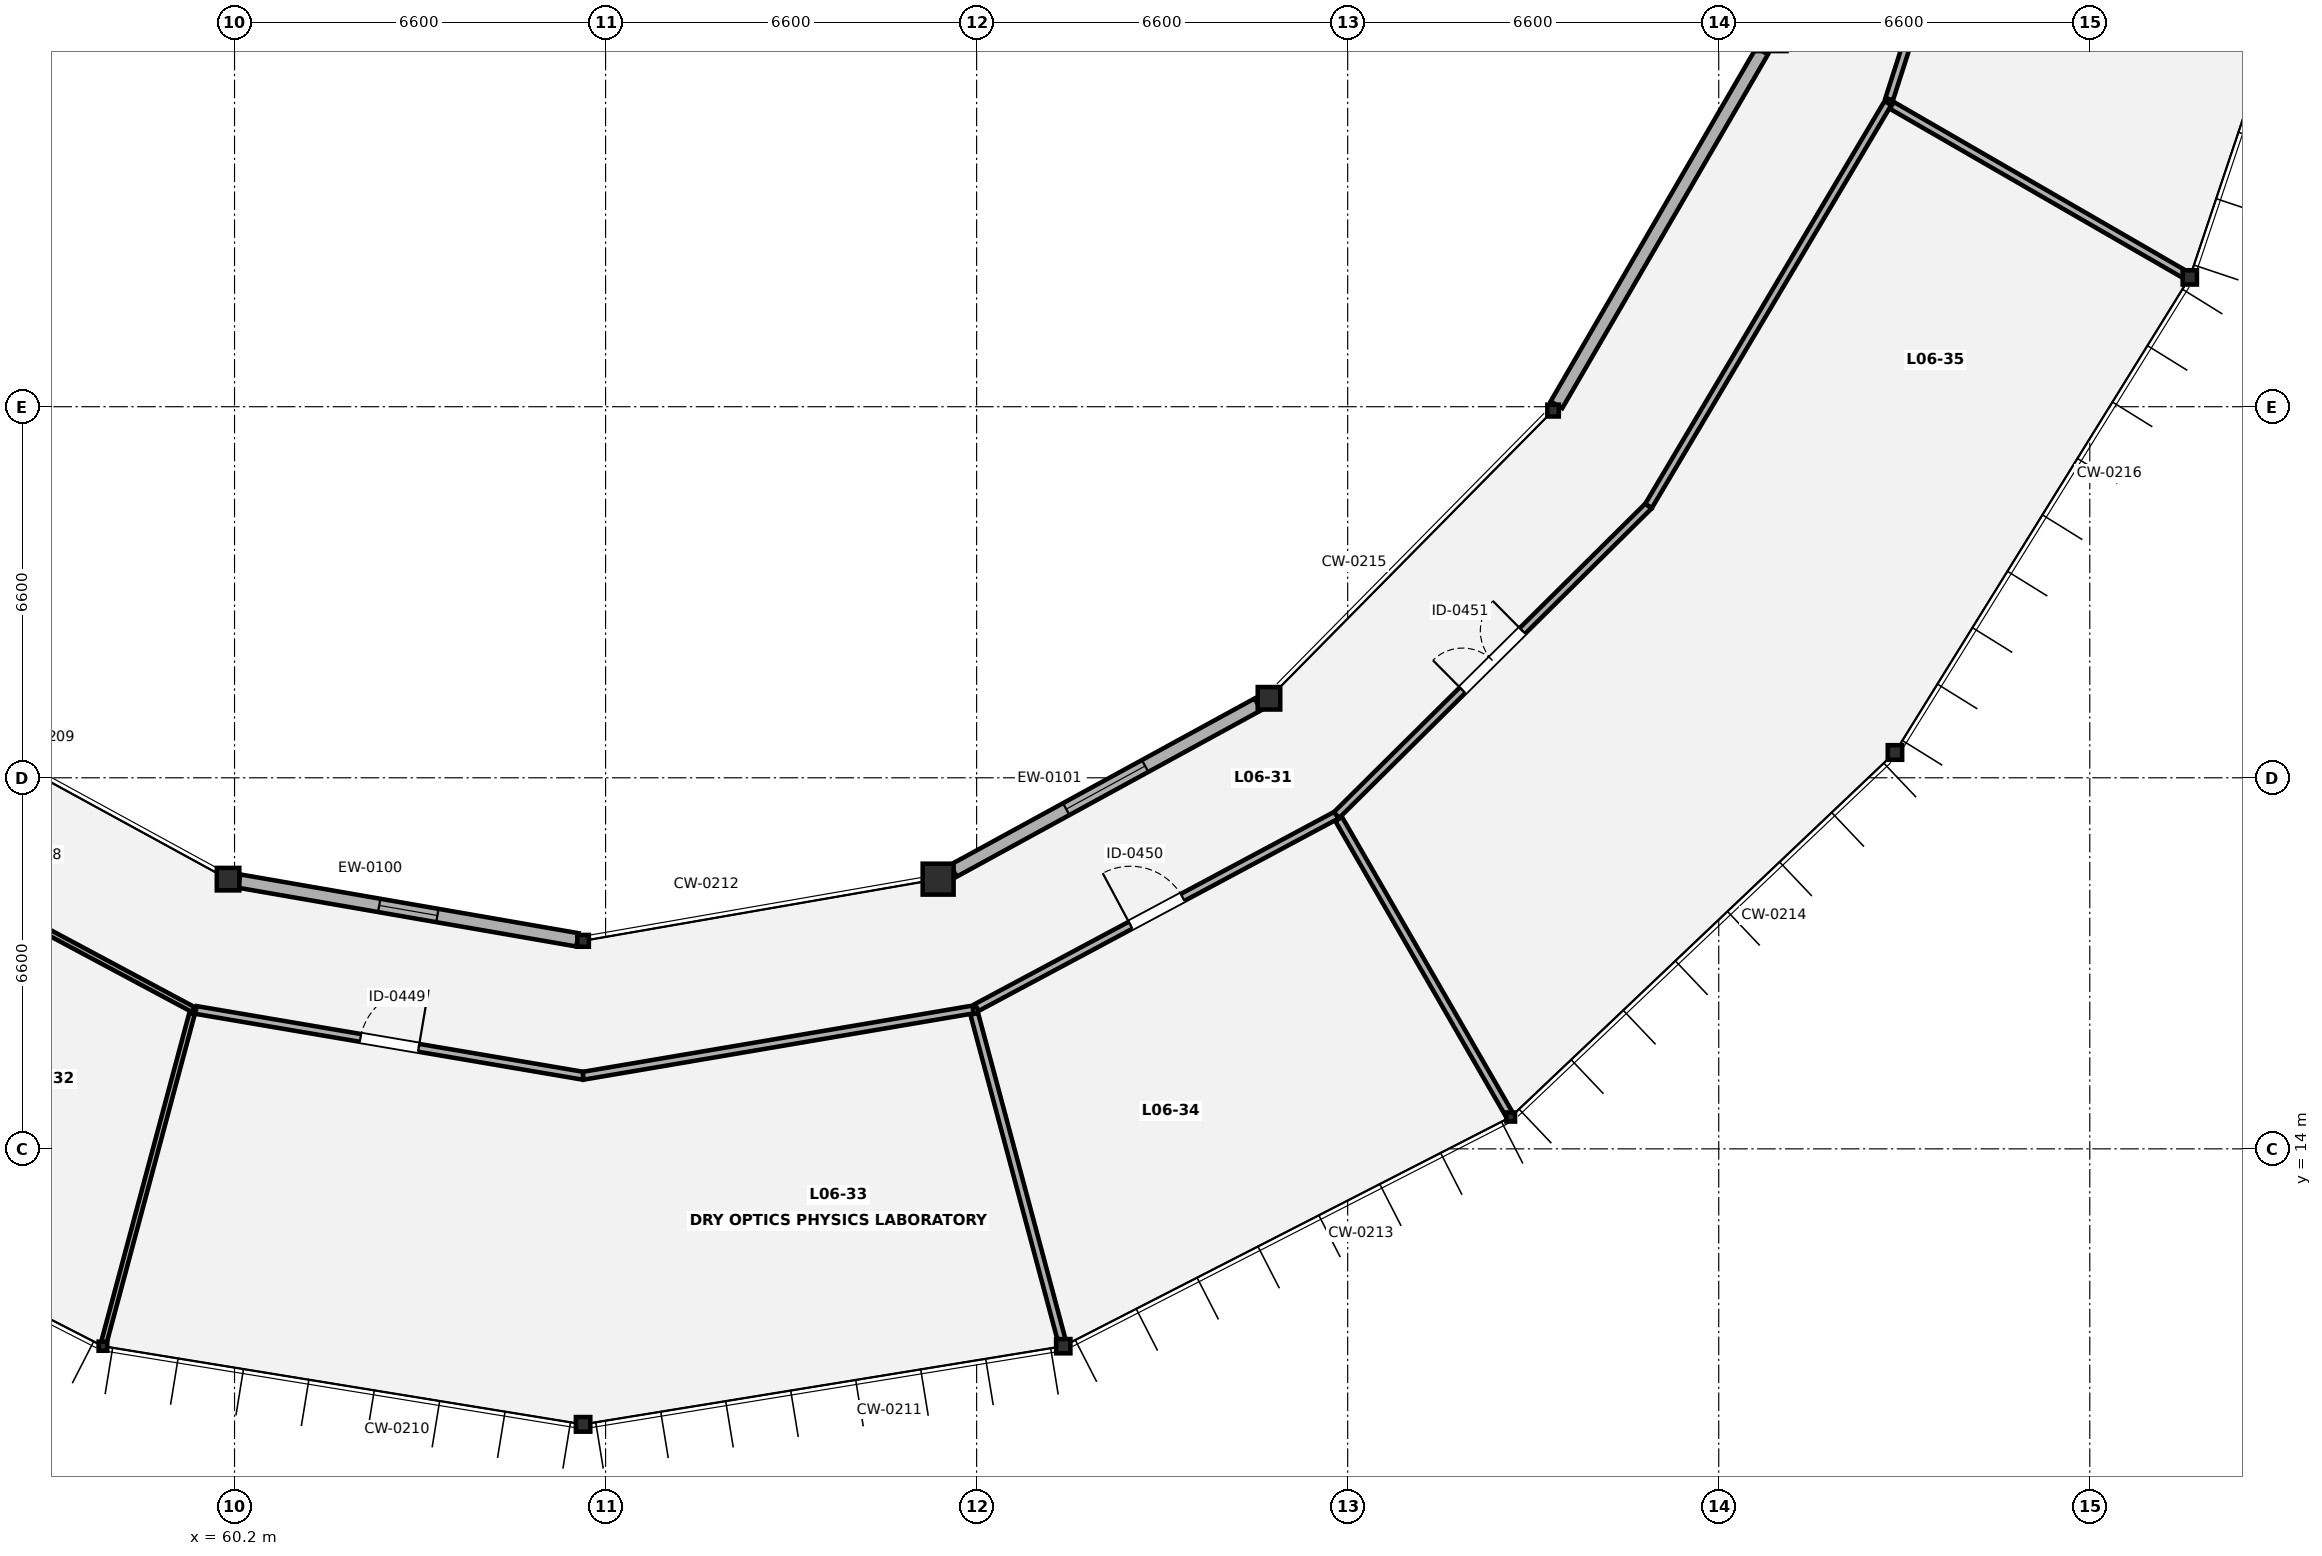
"""IFC4 building model, lengths in metres.
Left out: names, types, materials, properties, quantities, classifications, styles, units other than length and angle.
Written with IfcOpenShell. Run it as: python <this file> out.ifc"""

import sys

from ifc_helpers import new_model, si_unit, direction, frame, frame_2d, origin, origin_2d, place, context, subcontext, project, spatial, rectangle, i_section, extrude, element, fill, save


model = new_model("IFC4")
c1 = context("Model", 3, precision=1e-05, world=origin(), true_north=direction((0.0, 1.0)))
c2 = subcontext(c1, "Body", "Model", "MODEL_VIEW")
j1 = project(units=[si_unit("LENGTHUNIT", "METRE"), si_unit("PLANEANGLEUNIT", "RADIAN")], contexts=[c1])
p1 = place(None, origin())
s1 = spatial("IfcSite", under=j1, at=p1, CompositionType="ELEMENT")
p2 = place(p1, origin())
s2 = spatial("IfcBuilding", under=s1, at=p2, CompositionType="ELEMENT")
p3 = place(p2, frame((0.0, 0.0, 25.9)))
s3 = spatial("IfcBuildingStorey", under=s2, at=p3, CompositionType="ELEMENT", Elevation=25.9)
p4 = place(p3, frame((57.859, 10.49, 0.0), z_axis=(0.0, 0.0, 1.0), x_axis=(1.0, 0.0, 0.0)))
e1 = element("IfcColumn", 1, at=p4, inside=s3, PredefinedType="COLUMN", context=c2, shape_type="SweptSolid", body=[
    extrude(i_section(OverallWidth=0.154, OverallDepth=0.162, WebThickness=0.008, FlangeThickness=0.011, FilletRadius=0.009, at=origin_2d()), origin(), (0.0, 0.0, 1.0), 4.2),
])
p5 = place(p3, frame((60.085, 18.797, 0.0), z_axis=(0.0, 0.0, 1.0), x_axis=(1.0, 0.0, 0.0)))
e2 = element("IfcColumn", 2, at=p5, inside=s3, PredefinedType="PILASTER", context=c2, shape_type="SweptSolid", body=[
    extrude(rectangle(XDim=0.4, YDim=0.4, at=origin_2d()), origin(), (0.0, 0.0, 1.0), 4.2),
])
p6 = place(p3, frame((66.4, 9.1, 0.0), z_axis=(0.0, 0.0, 1.0), x_axis=(1.0, 0.0, 0.0)))
e3 = element("IfcColumn", 3, at=p6, inside=s3, PredefinedType="COLUMN", context=c2, shape_type="SweptSolid", body=[
    extrude(i_section(OverallWidth=0.256, OverallDepth=0.26, WebThickness=0.01, FlangeThickness=0.017, FilletRadius=0.014, at=origin_2d()), origin(), (0.0, 0.0, 1.0), 4.2),
])
p7 = place(p3, frame((66.4, 17.7, 0.0), z_axis=(0.0, 0.0, 1.0), x_axis=(1.0, 0.0, 0.0)))
e4 = element("IfcColumn", 4, at=p7, inside=s3, PredefinedType="COLUMN", context=c2, shape_type="SweptSolid", body=[
    extrude(i_section(OverallWidth=0.205, OverallDepth=0.21, WebThickness=0.009, FlangeThickness=0.014, FilletRadius=0.011, at=origin_2d()), origin(), (0.0, 0.0, 1.0), 4.2),
])
p8 = place(p3, frame((74.941, 10.49, 0.0), z_axis=(0.0, 0.0, 1.0), x_axis=(1.0, 0.0, 0.0)))
e5 = element("IfcColumn", 5, at=p8, inside=s3, PredefinedType="COLUMN", context=c2, shape_type="SweptSolid", body=[
    extrude(i_section(OverallWidth=0.254, OverallDepth=0.254, WebThickness=0.009, FlangeThickness=0.014, FilletRadius=0.014, at=origin_2d()), origin(), (0.0, 0.0, 1.0), 4.2),
])
p9 = place(p3, frame((72.715, 18.797, 0.0), z_axis=(0.0, 0.0, 1.0), x_axis=(1.0, 0.0, 0.0)))
e6 = element("IfcColumn", 6, at=p9, inside=s3, PredefinedType="COLUMN", context=c2, shape_type="SweptSolid", body=[
    extrude(rectangle(XDim=0.55, YDim=0.55, at=origin_2d()), origin(), (0.0, 0.0, 1.0), 4.2),
])
p10 = place(p3, frame((82.9, 14.566, 0.0), z_axis=(0.0, 0.0, 1.0), x_axis=(1.0, 0.0, 0.0)))
e7 = element("IfcColumn", 7, at=p10, inside=s3, PredefinedType="COLUMN", context=c2, shape_type="SweptSolid", body=[
    extrude(i_section(OverallWidth=0.154, OverallDepth=0.162, WebThickness=0.008, FlangeThickness=0.011, FilletRadius=0.009, at=origin_2d()), origin(), (0.0, 0.0, 1.0), 4.2),
])
p11 = place(p3, frame((78.6, 22.014, 0.0), z_axis=(0.0, 0.0, 1.0), x_axis=(1.0, 0.0, 0.0)))
e8 = element("IfcColumn", 8, at=p11, inside=s3, PredefinedType="PILASTER", context=c2, shape_type="SweptSolid", body=[
    extrude(rectangle(XDim=0.4, YDim=0.4, at=origin_2d()), origin(), (0.0, 0.0, 1.0), 4.2),
])
p12 = place(p3, frame((89.735, 21.05, 0.0), z_axis=(0.0, 0.0, 1.0), x_axis=(1.0, 0.0, 0.0)))
e9 = element("IfcColumn", 9, at=p12, inside=s3, PredefinedType="COLUMN", context=c2, shape_type="SweptSolid", body=[
    extrude(i_section(OverallWidth=0.256, OverallDepth=0.26, WebThickness=0.01, FlangeThickness=0.017, FilletRadius=0.014, at=origin_2d()), origin(), (0.0, 0.0, 1.0), 4.2),
])
p13 = place(p3, frame((83.653, 27.131, 0.0), z_axis=(0.0, 0.0, 1.0), x_axis=(1.0, 0.0, 0.0)))
e10 = element("IfcColumn", 10, at=p13, inside=s3, PredefinedType="COLUMN", context=c2, shape_type="SweptSolid", body=[
    extrude(i_section(OverallWidth=0.205, OverallDepth=0.21, WebThickness=0.009, FlangeThickness=0.014, FilletRadius=0.011, at=origin_2d()), origin(), (0.0, 0.0, 1.0), 4.2),
])
p14 = place(p3, frame((94.979, 29.5, 0.0), z_axis=(0.0, 0.0, 1.0), x_axis=(1.0, 0.0, 0.0)))
e11 = element("IfcColumn", 11, at=p14, inside=s3, PredefinedType="COLUMN", context=c2, shape_type="SweptSolid", body=[
    extrude(i_section(OverallWidth=0.254, OverallDepth=0.254, WebThickness=0.009, FlangeThickness=0.014, FilletRadius=0.014, at=origin_2d()), origin(), (0.0, 0.0, 1.0), 4.2),
])
p15 = place(p3, frame((60.283, 18.763, 0.0), z_axis=(0.0, 0.0, 1.0), x_axis=(0.985246064368, -0.171143777706, 0.0)))
e12 = element("IfcWall", 12, at=p15, inside=s3, PredefinedType="SOLIDWALL", context=c2, shape_type="SweptSolid", body=[
    extrude(rectangle(XDim=6.107, YDim=0.24, at=frame_2d((3.053, 0.0))), origin(), (0.0, 0.0, 1.0), 3.6),
])
p16 = place(p15, frame((2.528, 0.0, 0.85)))
e13 = element("IfcOpeningElement", 13, at=p16, cuts=e12, PredefinedType="OPENING", context=c2, shape_type="SweptSolid", body=[
    extrude(rectangle(XDim=1.05, YDim=1.35, at=frame_2d((0.525, 0.675))), frame((0.0, 0.13, 0.0), z_axis=(0.0, -1.0, 0.0), x_axis=(1.0, 0.0, 0.0)), (0.0, 0.0, 1.0), 0.26),
])
p17 = place(p3, frame((72.988, 18.947, 0.0), z_axis=(0.0, 0.0, 1.0), x_axis=(0.877477839064, 0.479617182712, 0.0)))
e14 = element("IfcWall", 14, at=p17, inside=s3, PredefinedType="SOLIDWALL", context=c2, shape_type="SweptSolid", body=[
    extrude(rectangle(XDim=6.169, YDim=0.24, at=frame_2d((3.085, 0.0))), origin(), (0.0, 0.0, 1.0), 3.6),
])
p18 = place(p17, frame((2.285, 0.0, 0.85)))
e15 = element("IfcOpeningElement", 15, at=p18, cuts=e14, PredefinedType="OPENING", context=c2, shape_type="SweptSolid", body=[
    extrude(rectangle(XDim=1.6, YDim=1.5, at=frame_2d((0.8, 0.75))), frame((0.0, 0.13, 0.0), z_axis=(0.0, -1.0, 0.0), x_axis=(1.0, 0.0, 0.0)), (0.0, 0.0, 1.0), 0.26),
])
p19 = place(p3, frame((83.713, 27.235, 0.0), z_axis=(0.0, 0.0, 1.0), x_axis=(0.502677590803, 0.864473967048, 0.0)))
e16 = element("IfcWall", 16, at=p19, inside=s3, PredefinedType="SOLIDWALL", context=c2, shape_type="SweptSolid", body=[
    extrude(rectangle(XDim=7.278, YDim=0.24, at=frame_2d((3.639, 0.0))), origin(), (0.0, 0.0, 1.0), 3.6),
])
p20 = place(p3, frame((53.0, 19.936, 0.0), z_axis=(0.0, 0.0, 1.0), x_axis=(0.88182684056, -0.471573348768, 0.0)))
e17 = element("IfcWall", 17, at=p20, inside=s3, PredefinedType="PARTITIONING", context=c2, shape_type="SweptSolid", body=[
    extrude(rectangle(XDim=7.33, YDim=0.1, at=frame_2d((3.665, 0.0))), origin(), (0.0, 0.0, 1.0), 4.0),
])
p21 = place(p20, frame((3.165, 0.0, 0.0)))
e18 = element("IfcOpeningElement", 18, at=p21, cuts=e17, PredefinedType="OPENING", context=c2, shape_type="SweptSolid", body=[
    extrude(rectangle(XDim=1.0, YDim=2.1, at=frame_2d((0.5, 1.05))), frame((0.0, 0.06, 0.0), z_axis=(0.0, -1.0, 0.0), x_axis=(1.0, 0.0, 0.0)), (0.0, 0.0, 1.0), 0.12),
])
p22 = place(p3, frame((59.443, 16.402, 0.0), z_axis=(0.0, 0.0, 1.0), x_axis=(-0.258805895167, -0.965929349708, 0.0)))
e19 = element("IfcWall", 19, at=p22, inside=s3, PredefinedType="PARTITIONING", context=c2, shape_type="SweptSolid", body=[
    extrude(rectangle(XDim=6.06, YDim=0.1, at=frame_2d((3.03, 0.0))), origin(), (0.0, 0.0, 1.0), 3.522),
])
p23 = place(p3, frame((59.515, 16.47, 0.0), z_axis=(0.0, 0.0, 1.0), x_axis=(0.985861622289, -0.167561516157, 0.0)))
e20 = element("IfcWall", 20, at=p23, inside=s3, PredefinedType="PARTITIONING", context=c2, shape_type="SweptSolid", body=[
    extrude(rectangle(XDim=6.983, YDim=0.14, at=frame_2d((3.492, 0.0))), origin(), (0.0, 0.0, 1.0), 4.0),
])
p24 = place(p23, frame((2.967, 0.0, 0.0)))
e21 = element("IfcOpeningElement", 21, at=p24, cuts=e20, PredefinedType="OPENING", context=c2, shape_type="SweptSolid", body=[
    extrude(rectangle(XDim=1.05, YDim=2.15, at=frame_2d((0.525, 1.075))), frame((0.0, 0.08, 0.0), z_axis=(0.0, -1.0, 0.0), x_axis=(1.0, 0.0, 0.0)), (0.0, 0.0, 1.0), 0.16),
])
p25 = place(p3, frame((66.402, 15.3, 0.0), z_axis=(0.0, 0.0, 1.0), x_axis=(0.985858771321, 0.167578289193, 0.0)))
e22 = element("IfcWall", 22, at=p25, inside=s3, PredefinedType="PARTITIONING", context=c2, shape_type="SweptSolid", body=[
    extrude(rectangle(XDim=7.034, YDim=0.14, at=frame_2d((3.517, 0.0))), origin(), (0.0, 0.0, 1.0), 4.0),
])
p26 = place(p3, frame((73.357, 16.402, 0.0), z_axis=(0.0, 0.0, 1.0), x_axis=(0.258805895167, -0.965929349708, 0.0)))
e23 = element("IfcWall", 23, at=p26, inside=s3, PredefinedType="PARTITIONING", context=c2, shape_type="SweptSolid", body=[
    extrude(rectangle(XDim=6.06, YDim=0.14, at=frame_2d((3.03, 0.0))), origin(), (0.0, 0.0, 1.0), 3.522),
])
p27 = place(p3, frame((73.402, 16.514, 0.0), z_axis=(0.0, 0.0, 1.0), x_axis=(0.881829873621, 0.471567676999, 0.0)))
e24 = element("IfcWall", 24, at=p27, inside=s3, PredefinedType="PARTITIONING", context=c2, shape_type="SweptSolid", body=[
    extrude(rectangle(XDim=7.256, YDim=0.14, at=frame_2d((3.628, 0.0))), origin(), (0.0, 0.0, 1.0), 4.0),
])
p28 = place(p27, frame((3.103, 0.0, 0.0)))
e25 = element("IfcOpeningElement", 25, at=p28, cuts=e24, PredefinedType="OPENING", context=c2, shape_type="SweptSolid", body=[
    extrude(rectangle(XDim=1.05, YDim=2.15, at=frame_2d((0.525, 1.075))), frame((0.0, 0.08, 0.0), z_axis=(0.0, -1.0, 0.0), x_axis=(1.0, 0.0, 0.0)), (0.0, 0.0, 1.0), 0.16),
])
p29 = place(p3, frame((79.84, 19.866, 0.0), z_axis=(0.0, 0.0, 1.0), x_axis=(0.500008418462, -0.866020543329, 0.0)))
e26 = element("IfcWall", 26, at=p29, inside=s3, PredefinedType="PARTITIONING", context=c2, shape_type="SweptSolid", body=[
    extrude(rectangle(XDim=6.06, YDim=0.14, at=frame_2d((3.03, 0.0))), origin(), (0.0, 0.0, 1.0), 3.522),
])
p30 = place(p3, frame((79.802, 19.937, 0.0), z_axis=(0.0, 0.0, 1.0), x_axis=(0.710427757183, 0.703770134222, 0.0)))
e27 = element("IfcWall", 27, at=p30, inside=s3, PredefinedType="PARTITIONING", context=c2, shape_type="SweptSolid", body=[
    extrude(rectangle(XDim=7.811, YDim=0.14, at=frame_2d((3.905, 0.0))), origin(), (0.0, 0.0, 1.0), 4.0),
])
p31 = place(p30, frame((3.156, 0.0, 0.0)))
e28 = element("IfcOpeningElement", 28, at=p31, cuts=e27, PredefinedType="OPENING", context=c2, shape_type="SweptSolid", body=[
    extrude(rectangle(XDim=1.5, YDim=2.15, at=frame_2d((0.75, 1.075))), frame((0.0, 0.08, 0.0), z_axis=(0.0, -1.0, 0.0), x_axis=(1.0, 0.0, 0.0)), (0.0, 0.0, 1.0), 0.16),
])
p32 = place(p3, frame((85.352, 25.436, 0.0), z_axis=(0.0, 0.0, 1.0), x_axis=(0.510915698067, 0.859630821614, 0.0)))
e29 = element("IfcWall", 29, at=p32, inside=s3, PredefinedType="PARTITIONING", context=c2, shape_type="SweptSolid", body=[
    extrude(rectangle(XDim=8.334, YDim=0.14, at=frame_2d((4.167, 0.0))), origin(), (0.0, 0.0, 1.0), 4.0),
])
p33 = place(p3, frame((89.679, 32.56, 0.0), z_axis=(0.0, 0.0, 1.0), x_axis=(0.866020543329, -0.500008418462, 0.0)))
e30 = element("IfcWall", 30, at=p33, inside=s3, PredefinedType="PARTITIONING", context=c2, shape_type="SweptSolid", body=[
    extrude(rectangle(XDim=6.06, YDim=0.14, at=frame_2d((3.03, 0.0))), origin(), (0.0, 0.0, 1.0), 3.471),
])
p34 = place(p3, frame((89.632, 32.67, 0.0), z_axis=(0.0, 0.0, 1.0), x_axis=(0.305495322231, 0.952193577008, 0.0)))
e31 = element("IfcWall", 31, at=p34, inside=s3, PredefinedType="PARTITIONING", context=c2, shape_type="SweptSolid", body=[
    extrude(rectangle(XDim=8.69, YDim=0.14, at=frame_2d((4.345, 0.0))), origin(), (0.0, 0.0, 1.0), 4.0),
])
p35 = place(p34, frame((3.82, 0.0, 0.0)))
e32 = element("IfcOpeningElement", 32, at=p35, cuts=e31, PredefinedType="OPENING", context=c2, shape_type="SweptSolid", body=[
    extrude(rectangle(XDim=1.05, YDim=2.15, at=frame_2d((0.525, 1.075))), frame((0.0, 0.08, 0.0), z_axis=(0.0, -1.0, 0.0), x_axis=(1.0, 0.0, 0.0)), (0.0, 0.0, 1.0), 0.16),
])
p36 = place(p16, origin())
e33 = element("IfcWindow", 33, at=p36, inside=s3, PartitioningType="SINGLE_PANEL", PredefinedType="WINDOW", context=c2, shape_type="SweptSolid", body=[
    extrude(rectangle(XDim=1.05, YDim=1.35, at=frame_2d((0.525, 0.675))), frame((0.0, 0.03, 0.0), z_axis=(0.0, -1.0, 0.0), x_axis=(1.0, 0.0, 0.0)), (0.0, 0.0, 1.0), 0.06),
])
fill(e13, e33)
p37 = place(p18, origin())
e34 = element("IfcWindow", 34, at=p37, inside=s3, PartitioningType="SINGLE_PANEL", PredefinedType="WINDOW", context=c2, shape_type="SweptSolid", body=[
    extrude(rectangle(XDim=1.6, YDim=1.5, at=frame_2d((0.8, 0.75))), frame((0.0, 0.03, 0.0), z_axis=(0.0, -1.0, 0.0), x_axis=(1.0, 0.0, 0.0)), (0.0, 0.0, 1.0), 0.06),
])
fill(e15, e34)
p38 = place(p24, origin())
e35 = element("IfcDoor", 35, at=p38, inside=s3, OperationType="SINGLE_SWING_RIGHT", PredefinedType="DOOR", context=c2, shape_type="SweptSolid", body=[
    extrude(rectangle(XDim=1.05, YDim=2.15, at=frame_2d((0.525, 1.075))), frame((0.0, 0.025, 0.0), z_axis=(0.0, -1.0, 0.0), x_axis=(1.0, 0.0, 0.0)), (0.0, 0.0, 1.0), 0.05),
])
fill(e21, e35)
p39 = place(p28, origin())
e36 = element("IfcDoor", 36, at=p39, inside=s3, OperationType="SINGLE_SWING_LEFT", PredefinedType="DOOR", context=c2, shape_type="SweptSolid", body=[
    extrude(rectangle(XDim=1.05, YDim=2.15, at=frame_2d((0.525, 1.075))), frame((0.0, 0.025, 0.0), z_axis=(0.0, -1.0, 0.0), x_axis=(1.0, 0.0, 0.0)), (0.0, 0.0, 1.0), 0.05),
])
fill(e25, e36)
p40 = place(p31, origin())
e37 = element("IfcDoor", 37, at=p40, inside=s3, OperationType="DOUBLE_DOOR_SINGLE_SWING", PredefinedType="DOOR", context=c2, shape_type="SweptSolid", body=[
    extrude(rectangle(XDim=1.5, YDim=2.15, at=frame_2d((0.75, 1.075))), frame((0.0, 0.025, 0.0), z_axis=(0.0, -1.0, 0.0), x_axis=(1.0, 0.0, 0.0)), (0.0, 0.0, 1.0), 0.05),
])
fill(e28, e37)
save(model, sys.argv[1])
